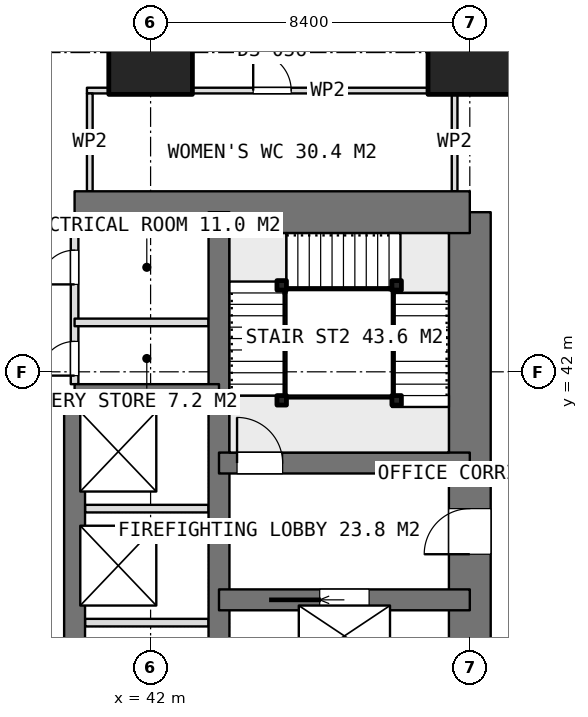
"""IFC4 building model, lengths in metres.
Left out: names, types, materials, properties, quantities, classifications, styles, units other than length and angle.
Written with IfcOpenShell. Run it as: python <this file> out.ifc"""

import sys

from ifc_helpers import new_model, si_unit, direction, frame, frame_2d, origin, origin_2d, place, context, subcontext, project, spatial, rectangle, extrude, element, fill, save


model = new_model("IFC4")
c1 = context("Model", 3, precision=1e-05, world=origin(), true_north=direction((0.0, 1.0)))
c2 = subcontext(c1, "Body", "Model", "MODEL_VIEW")
j1 = project(units=[si_unit("LENGTHUNIT", "METRE"), si_unit("PLANEANGLEUNIT", "RADIAN")], contexts=[c1])
p1 = place(None, origin())
s1 = spatial("IfcSite", under=j1, at=p1, CompositionType="ELEMENT")
p2 = place(p1, origin())
s2 = spatial("IfcBuilding", under=s1, at=p2, CompositionType="ELEMENT")
p3 = place(p2, frame((0.0, 0.0, 47.9)))
s3 = spatial("IfcBuildingStorey", under=s2, at=p3, CompositionType="ELEMENT", Elevation=47.9)
p4 = place(p3, frame((40.0, 46.2, 0.0), z_axis=(0.0, 0.0, 1.0), x_axis=(1.0, 0.0, 0.0)))
e1 = element("IfcWall", 1, at=p4, inside=s3, PredefinedType="SHEAR", context=c2, shape_type="SweptSolid", body=[
    extrude(rectangle(XDim=10.4, YDim=1.1, at=frame_2d((5.2, 0.0))), origin(), (0.0, 0.0, 1.0), 3.75),
])
p5 = place(p3, frame((50.4, 21.0, 0.0), z_axis=(0.0, 0.0, 1.0), x_axis=(0.0, 1.0, 0.0)))
e2 = element("IfcWall", 2, at=p5, inside=s3, PredefinedType="SHEAR", context=c2, shape_type="SweptSolid", body=[
    extrude(rectangle(XDim=25.2, YDim=1.1, at=frame_2d((12.6, 0.0))), origin(), (0.0, 0.0, 1.0), 3.75),
])
p6 = place(p5, frame((16.2, 0.0, 0.0)))
e3 = element("IfcOpeningElement", 3, at=p6, cuts=e2, PredefinedType="OPENING", context=c2, shape_type="SweptSolid", body=[
    extrude(rectangle(XDim=1.2, YDim=2.1, at=frame_2d((0.6, 1.05))), frame((0.0, 0.56, 0.0), z_axis=(0.0, -1.0, 0.0), x_axis=(1.0, 0.0, 0.0)), (0.0, 0.0, 1.0), 1.12),
])
p7 = place(p5, frame((10.05, 0.0, 0.0)))
e4 = element("IfcOpeningElement", 4, at=p7, cuts=e2, PredefinedType="OPENING", context=c2, shape_type="SweptSolid", body=[
    extrude(rectangle(XDim=0.9, YDim=2.1, at=frame_2d((0.45, 1.05))), frame((0.0, 0.56, 0.0), z_axis=(0.0, -1.0, 0.0), x_axis=(1.0, 0.0, 0.0)), (0.0, 0.0, 1.0), 1.12),
])
p8 = place(p5, frame((7.45, 0.0, 0.0)))
e5 = element("IfcOpeningElement", 5, at=p8, cuts=e2, PredefinedType="OPENING", context=c2, shape_type="SweptSolid", body=[
    extrude(rectangle(XDim=0.9, YDim=2.1, at=frame_2d((0.45, 1.05))), frame((0.0, 0.56, 0.0), z_axis=(0.0, -1.0, 0.0), x_axis=(1.0, 0.0, 0.0)), (0.0, 0.0, 1.0), 1.12),
])
p9 = place(p5, frame((0.75, 0.0, 0.0)))
e6 = element("IfcOpeningElement", 6, at=p9, cuts=e2, PredefinedType="OPENING", context=c2, shape_type="SweptSolid", body=[
    extrude(rectangle(XDim=1.2, YDim=2.1, at=frame_2d((0.6, 1.05))), frame((0.0, 0.56, 0.0), z_axis=(0.0, -1.0, 0.0), x_axis=(1.0, 0.0, 0.0)), (0.0, 0.0, 1.0), 1.12),
])
p10 = place(p3, frame((43.8, 21.0, 0.0), z_axis=(0.0, 0.0, 1.0), x_axis=(0.0, 1.0, 0.0)))
e7 = element("IfcWall", 7, at=p10, inside=s3, PredefinedType="SHEAR", context=c2, shape_type="SweptSolid", body=[
    extrude(rectangle(XDim=25.2, YDim=0.55, at=frame_2d((12.6, 0.0))), origin(), (0.0, 0.0, 1.0), 3.75),
])
p11 = place(p3, frame((40.0, 23.4, 0.0), z_axis=(0.0, 0.0, 1.0), x_axis=(0.0, 1.0, 0.0)))
e8 = element("IfcWall", 8, at=p11, inside=s3, PredefinedType="SHEAR", context=c2, shape_type="SweptSolid", body=[
    extrude(rectangle(XDim=18.0, YDim=0.55, at=frame_2d((9.0, 0.0))), origin(), (0.0, 0.0, 1.0), 3.75),
])
p12 = place(p3, frame((40.0, 41.4, 0.0), z_axis=(0.0, 0.0, 1.0), x_axis=(1.0, 0.0, 0.0)))
e9 = element("IfcWall", 9, at=p12, inside=s3, PredefinedType="SHEAR", context=c2, shape_type="SweptSolid", body=[
    extrude(rectangle(XDim=3.8, YDim=0.55, at=frame_2d((1.9, 0.0))), origin(), (0.0, 0.0, 1.0), 3.75),
])
p13 = place(p3, frame((43.8, 36.0, 0.0), z_axis=(0.0, 0.0, 1.0), x_axis=(1.0, 0.0, 0.0)))
e10 = element("IfcWall", 10, at=p13, inside=s3, PredefinedType="SHEAR", context=c2, shape_type="SweptSolid", body=[
    extrude(rectangle(XDim=6.6, YDim=0.55, at=frame_2d((3.3, 0.0))), origin(), (0.0, 0.0, 1.0), 3.75),
])
p14 = place(p13, frame((2.65, 0.0, 0.0)))
e11 = element("IfcOpeningElement", 11, at=p14, cuts=e10, PredefinedType="OPENING", context=c2, shape_type="SweptSolid", body=[
    extrude(rectangle(XDim=1.3, YDim=2.1, at=frame_2d((0.65, 1.05))), frame((0.0, 0.285, 0.0), z_axis=(0.0, -1.0, 0.0), x_axis=(1.0, 0.0, 0.0)), (0.0, 0.0, 1.0), 0.57),
])
p15 = place(p3, frame((43.8, 39.6, 0.0), z_axis=(0.0, 0.0, 1.0), x_axis=(1.0, 0.0, 0.0)))
e12 = element("IfcWall", 12, at=p15, inside=s3, PredefinedType="SHEAR", context=c2, shape_type="SweptSolid", body=[
    extrude(rectangle(XDim=6.6, YDim=0.55, at=frame_2d((3.3, 0.0))), origin(), (0.0, 0.0, 1.0), 3.75),
])
p16 = place(p15, frame((0.475, 0.0, 0.0)))
e13 = element("IfcOpeningElement", 13, at=p16, cuts=e12, PredefinedType="OPENING", context=c2, shape_type="SweptSolid", body=[
    extrude(rectangle(XDim=1.2, YDim=2.1, at=frame_2d((0.6, 1.05))), frame((0.0, 0.285, 0.0), z_axis=(0.0, -1.0, 0.0), x_axis=(1.0, 0.0, 0.0)), (0.0, 0.0, 1.0), 0.57),
])
for number, where, z_axis, x_axis in (
    (14, (42.0, 50.4, 0.0), (0.0, 0.0, 1.0), (1.0, 0.0, 0.0)),
    (15, (50.4, 50.4, 0.0), (0.0, 0.0, 1.0), (1.0, 0.0, 0.0)),
):
    element("IfcColumn", number, at=place(p3, frame(where, z_axis=z_axis, x_axis=x_axis)), inside=s3, PredefinedType="COLUMN", context=c2, shape_type="SweptSolid", body=[
        extrude(rectangle(XDim=2.2, YDim=2.2, at=origin_2d()), origin(), (0.0, 0.0, 1.0), 3.75),
    ])
for number, where, z_axis, x_axis in (
    (16, (40.275, 35.4, 0.0), (0.0, 0.0, 1.0), (1.0, 0.0, 0.0)),
    (17, (40.275, 38.4, 0.0), (0.0, 0.0, 1.0), (1.0, 0.0, 0.0)),
):
    element("IfcWall", number, at=place(p3, frame(where, z_axis=z_axis, x_axis=x_axis)), inside=s3, PredefinedType="PARTITIONING", context=c2, shape_type="SweptSolid", body=[
        extrude(rectangle(XDim=3.25, YDim=0.2, at=frame_2d((1.625, 0.0))), origin(), (0.0, 0.0, 1.0), 3.5),
    ])
p17 = place(p3, frame((40.0, 41.675, 0.0), z_axis=(0.0, 0.0, 1.0), x_axis=(0.0, 1.0, 0.0)))
e18 = element("IfcWall", 18, at=p17, inside=s3, PredefinedType="PARTITIONING", context=c2, shape_type="SweptSolid", body=[
    extrude(rectangle(XDim=3.975, YDim=0.2, at=frame_2d((1.987, 0.0))), origin(), (0.0, 0.0, 1.0), 3.5),
])
p18 = place(p17, frame((2.625, 0.0, 0.0)))
e19 = element("IfcOpeningElement", 19, at=p18, cuts=e18, PredefinedType="OPENING", context=c2, shape_type="SweptSolid", body=[
    extrude(rectangle(XDim=0.9, YDim=2.1, at=frame_2d((0.45, 1.05))), frame((0.0, 0.11, 0.0), z_axis=(0.0, -1.0, 0.0), x_axis=(1.0, 0.0, 0.0)), (0.0, 0.0, 1.0), 0.22),
])
p19 = place(p17, frame((0.225, 0.0, 0.0)))
e20 = element("IfcOpeningElement", 20, at=p19, cuts=e18, PredefinedType="OPENING", context=c2, shape_type="SweptSolid", body=[
    extrude(rectangle(XDim=0.9, YDim=2.1, at=frame_2d((0.45, 1.05))), frame((0.0, 0.11, 0.0), z_axis=(0.0, -1.0, 0.0), x_axis=(1.0, 0.0, 0.0)), (0.0, 0.0, 1.0), 0.22),
])
p20 = place(p3, frame((40.0, 43.3, 0.0), z_axis=(0.0, 0.0, 1.0), x_axis=(1.0, 0.0, 0.0)))
e21 = element("IfcWall", 21, at=p20, inside=s3, PredefinedType="PARTITIONING", context=c2, shape_type="SweptSolid", body=[
    extrude(rectangle(XDim=3.525, YDim=0.2, at=frame_2d((1.762, 0.0))), origin(), (0.0, 0.0, 1.0), 3.5),
])
p21 = place(p3, frame((40.325, 49.4, 0.0), z_axis=(0.0, 0.0, 1.0), x_axis=(1.0, 0.0, 0.0)))
e22 = element("IfcWall", 22, at=p21, inside=s3, PredefinedType="PARTITIONING", context=c2, shape_type="SweptSolid", body=[
    extrude(rectangle(XDim=9.75, YDim=0.15, at=frame_2d((4.875, 0.0))), origin(), (0.0, 0.0, 1.0), 3.5),
])
p22 = place(p21, frame((4.375, 0.0, 0.0)))
e23 = element("IfcOpeningElement", 23, at=p22, cuts=e22, PredefinedType="OPENING", context=c2, shape_type="SweptSolid", body=[
    extrude(rectangle(XDim=1.0, YDim=2.1, at=frame_2d((0.5, 1.05))), frame((0.0, 0.085, 0.0), z_axis=(0.0, -1.0, 0.0), x_axis=(1.0, 0.0, 0.0)), (0.0, 0.0, 1.0), 0.17),
])
for number, where, z_axis, x_axis in (
    (24, (40.4, 46.75, 0.0), (0.0, 0.0, 1.0), (0.0, 1.0, 0.0)),
    (25, (50.0, 46.75, 0.0), (0.0, 0.0, 1.0), (0.0, 1.0, 0.0)),
):
    element("IfcWall", number, at=place(p3, frame(where, z_axis=z_axis, x_axis=x_axis)), inside=s3, PredefinedType="PARTITIONING", context=c2, shape_type="SweptSolid", body=[
        extrude(rectangle(XDim=2.575, YDim=0.15, at=frame_2d((1.288, 0.0))), origin(), (0.0, 0.0, 1.0), 3.5),
    ])
for number, where, z_axis, x_axis in (
    (26, (45.45, 41.25, 0.0), (0.0, 0.0, 1.0), (1.0, 0.0, 0.0)),
    (27, (45.45, 44.275, 0.0), (0.0, 0.0, 1.0), (1.0, 0.0, 0.0)),
    (28, (48.475, 44.275, 0.0), (0.0, 0.0, 1.0), (1.0, 0.0, 0.0)),
    (29, (48.475, 41.25, 0.0), (0.0, 0.0, 1.0), (1.0, 0.0, 0.0)),
):
    element("IfcColumn", number, at=place(p3, frame(where, z_axis=z_axis, x_axis=x_axis)), inside=s3, PredefinedType="COLUMN", context=c2, shape_type="SweptSolid", body=[
        extrude(rectangle(XDim=0.25, YDim=0.25, at=origin_2d()), origin(), (0.0, 0.0, 1.0), 3.75),
    ])
p23 = place(p6, origin())
e30 = element("IfcDoor", 30, at=p23, inside=s3, OperationType="SINGLE_SWING_LEFT", PredefinedType="DOOR", context=c2, shape_type="SweptSolid", body=[
    extrude(rectangle(XDim=1.2, YDim=2.1, at=frame_2d((0.6, 1.05))), frame((0.0, 0.025, 0.0), z_axis=(0.0, -1.0, 0.0), x_axis=(1.0, 0.0, 0.0)), (0.0, 0.0, 1.0), 0.05),
])
fill(e3, e30)
p24 = place(p18, origin())
e31 = element("IfcDoor", 31, at=p24, inside=s3, OperationType="SINGLE_SWING_LEFT", PredefinedType="DOOR", context=c2, shape_type="SweptSolid", body=[
    extrude(rectangle(XDim=0.9, YDim=2.1, at=frame_2d((0.45, 1.05))), frame((0.0, 0.025, 0.0), z_axis=(0.0, -1.0, 0.0), x_axis=(1.0, 0.0, 0.0)), (0.0, 0.0, 1.0), 0.05),
])
fill(e19, e31)
p25 = place(p19, origin())
e32 = element("IfcDoor", 32, at=p25, inside=s3, OperationType="SINGLE_SWING_LEFT", PredefinedType="DOOR", context=c2, shape_type="SweptSolid", body=[
    extrude(rectangle(XDim=0.9, YDim=2.1, at=frame_2d((0.45, 1.05))), frame((0.0, 0.025, 0.0), z_axis=(0.0, -1.0, 0.0), x_axis=(1.0, 0.0, 0.0)), (0.0, 0.0, 1.0), 0.05),
])
fill(e20, e32)
p26 = place(p14, origin())
e33 = element("IfcDoor", 33, at=p26, inside=s3, OperationType="SLIDING_TO_LEFT", PredefinedType="USERDEFINED", context=c2, shape_type="SweptSolid", body=[
    extrude(rectangle(XDim=1.3, YDim=2.1, at=frame_2d((0.65, 1.05))), frame((0.0, 0.025, 0.0), z_axis=(0.0, -1.0, 0.0), x_axis=(1.0, 0.0, 0.0)), (0.0, 0.0, 1.0), 0.05),
])
fill(e11, e33)
p27 = place(p22, origin())
e34 = element("IfcDoor", 34, at=p27, inside=s3, OperationType="SINGLE_SWING_LEFT", PredefinedType="DOOR", context=c2, shape_type="SweptSolid", body=[
    extrude(rectangle(XDim=1.0, YDim=2.1, at=frame_2d((0.5, 1.05))), frame((0.0, 0.025, 0.0), z_axis=(0.0, -1.0, 0.0), x_axis=(1.0, 0.0, 0.0)), (0.0, 0.0, 1.0), 0.05),
])
fill(e23, e34)
p28 = place(p16, origin())
e35 = element("IfcDoor", 35, at=p28, inside=s3, OperationType="SINGLE_SWING_RIGHT", PredefinedType="DOOR", context=c2, shape_type="SweptSolid", body=[
    extrude(rectangle(XDim=1.2, YDim=2.1, at=frame_2d((0.6, 1.05))), frame((0.0, 0.025, 0.0), z_axis=(0.0, -1.0, 0.0), x_axis=(1.0, 0.0, 0.0)), (0.0, 0.0, 1.0), 0.05),
])
fill(e13, e35)
save(model, sys.argv[1])
